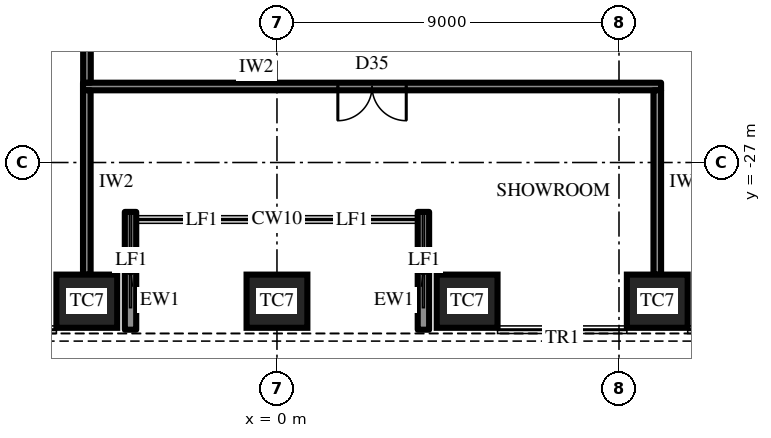
"""IFC4 building model, lengths in metres.
Left out: names, types, materials, properties, quantities, classifications, styles, units other than length and angle.
Written with IfcOpenShell. Run it as: python <this file> out.ifc"""

import sys

from ifc_helpers import new_model, si_unit, direction, frame, frame_2d, origin, origin_2d, place, context, subcontext, project, spatial, rectangle, extrude, element, fill, save


model = new_model("IFC4")
c1 = context("Model", 3, precision=1e-05, world=origin(), true_north=direction((0.0, 1.0)))
c2 = subcontext(c1, "Body", "Model", "MODEL_VIEW")
j1 = project(units=[si_unit("LENGTHUNIT", "METRE"), si_unit("PLANEANGLEUNIT", "RADIAN")], contexts=[c1])
p1 = place(None, origin())
s1 = spatial("IfcSite", under=j1, at=p1, CompositionType="ELEMENT")
p2 = place(p1, origin())
s2 = spatial("IfcBuilding", under=s1, at=p2, CompositionType="ELEMENT")
p3 = place(p2, frame((0.0, 0.0, 178.3)))
s3 = spatial("IfcBuildingStorey", under=s2, at=p3, CompositionType="ELEMENT", Elevation=178.3)
for number, where, z_axis, x_axis in (
    (1, (-5.004, -30.65, 0.0), (0.0, 0.0, 1.0), (1.0, 0.0, 0.0)),
    (2, (0.0, -30.65, 0.0), (0.0, 0.0, 1.0), (1.0, 0.0, 0.0)),
    (3, (5.004, -30.65, 0.0), (0.0, 0.0, 1.0), (1.0, 0.0, 0.0)),
    (4, (10.007, -30.65, 0.0), (0.0, 0.0, 1.0), (1.0, 0.0, 0.0)),
):
    element("IfcColumn", number, at=place(p3, frame(where, z_axis=z_axis, x_axis=x_axis)), inside=s3, PredefinedType="COLUMN", context=c2, shape_type="SweptSolid", body=[
        extrude(rectangle(XDim=1.6, YDim=1.4, at=origin_2d()), origin(), (0.0, 0.0, 1.0), 4.2),
    ])
for number, where, z_axis, x_axis in (
    (5, (-3.854, -31.4, 0.0), (0.0, 0.0, 1.0), (0.0, 1.0, 0.0)),
    (6, (3.854, -31.4, 0.0), (0.0, 0.0, 1.0), (0.0, 1.0, 0.0)),
):
    element("IfcWall", number, at=place(p3, frame(where, z_axis=z_axis, x_axis=x_axis)), inside=s3, PredefinedType="SOLIDWALL", context=c2, shape_type="SweptSolid", body=[
        extrude(rectangle(XDim=3.1, YDim=0.3, at=frame_2d((1.55, 0.0))), origin(), (0.0, 0.0, 1.0), 2.75),
    ])
p4 = place(p3, frame((-5.104, -25.0, 0.0), z_axis=(0.0, 0.0, 1.0), x_axis=(1.0, 0.0, 0.0)))
e7 = element("IfcWall", 7, at=p4, inside=s3, PredefinedType="PARTITIONING", context=c2, shape_type="SweptSolid", body=[
    extrude(rectangle(XDim=15.211, YDim=0.2, at=frame_2d((7.605, 0.0))), origin(), (0.0, 0.0, 1.0), 4.0),
])
p5 = place(p4, frame((6.706, 0.0, 0.0)))
e8 = element("IfcOpeningElement", 8, at=p5, cuts=e7, PredefinedType="OPENING", context=c2, shape_type="SweptSolid", body=[
    extrude(rectangle(XDim=1.8, YDim=2.4, at=frame_2d((0.9, 1.2))), frame((0.0, 0.11, 0.0), z_axis=(0.0, -1.0, 0.0), x_axis=(1.0, 0.0, 0.0)), (0.0, 0.0, 1.0), 0.22),
])
for number, where, z_axis, x_axis in (
    (9, (-5.004, -25.1, 0.0), (0.0, 0.0, 1.0), (0.0, -1.0, 0.0)),
    (10, (10.007, -25.1, 0.0), (0.0, 0.0, 1.0), (0.0, -1.0, 0.0)),
):
    element("IfcWall", number, at=place(p3, frame(where, z_axis=z_axis, x_axis=x_axis)), inside=s3, PredefinedType="PARTITIONING", context=c2, shape_type="SweptSolid", body=[
        extrude(rectangle(XDim=4.85, YDim=0.2, at=frame_2d((2.425, 0.0))), origin(), (0.0, 0.0, 1.0), 2.992),
    ])
p6 = place(p3, frame((-5.0, -18.7, 0.0), z_axis=(0.0, 0.0, 1.0), x_axis=(0.0, -1.0, 0.0)))
e11 = element("IfcWall", 11, at=p6, inside=s3, PredefinedType="PARTITIONING", context=c2, shape_type="SweptSolid", body=[
    extrude(rectangle(XDim=6.2, YDim=0.2, at=frame_2d((3.1, 0.0))), origin(), (0.0, 0.0, 1.0), 2.992),
])
p7 = place(p5, frame((1.8, 0.0, 0.0), z_axis=(0.0, 0.0, 1.0), x_axis=(-1.0, 0.0, 0.0)))
e12 = element("IfcDoor", 12, at=p7, inside=s3, OperationType="DOUBLE_DOOR_SINGLE_SWING", PredefinedType="DOOR", context=c2, shape_type="SweptSolid", body=[
    extrude(rectangle(XDim=1.8, YDim=2.4, at=frame_2d((0.9, 1.2))), frame((0.0, 0.025, 0.0), z_axis=(0.0, -1.0, 0.0), x_axis=(1.0, 0.0, 0.0)), (0.0, 0.0, 1.0), 0.05),
])
fill(e8, e12)
save(model, sys.argv[1])
